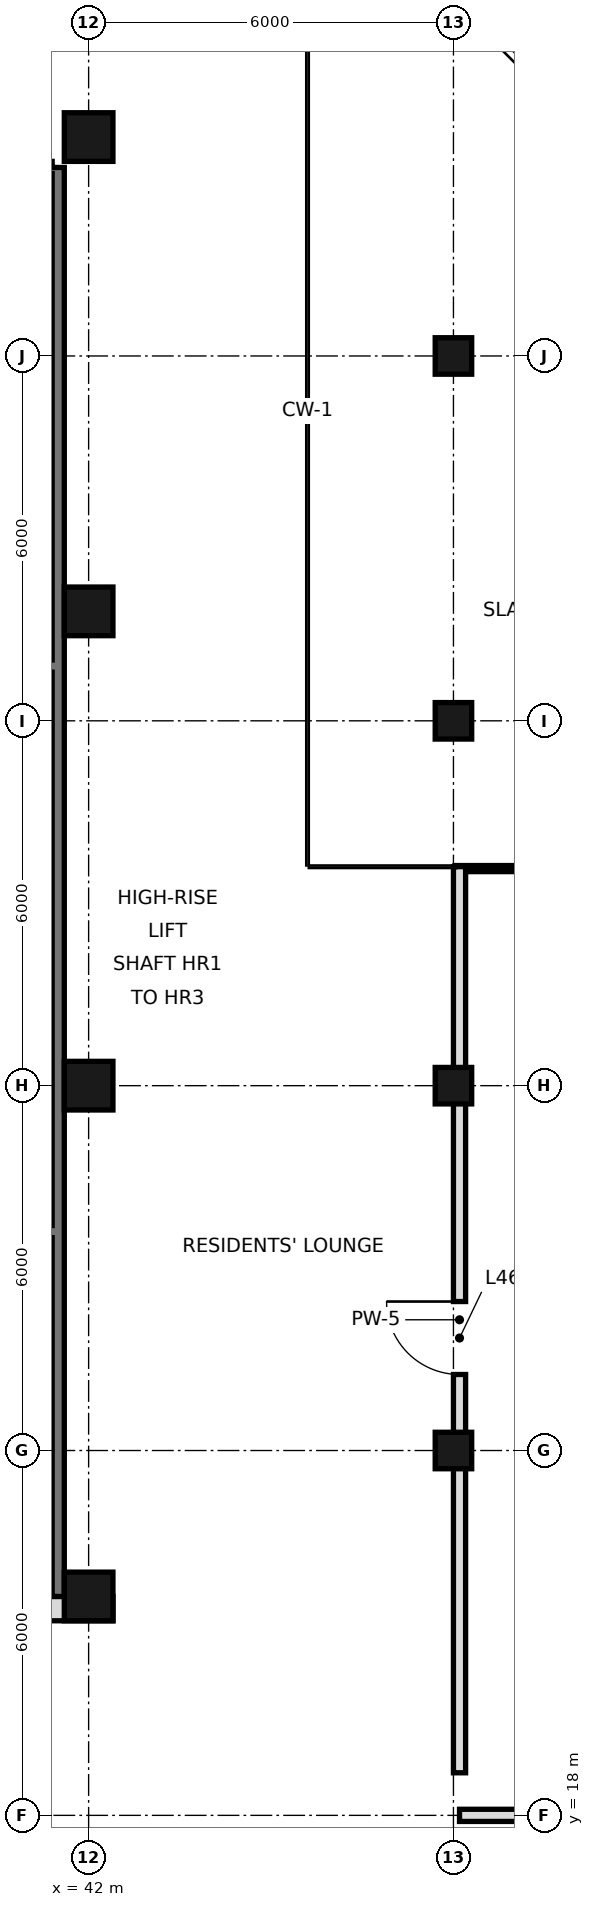
"""IFC4 building model, lengths in metres.
Left out: names, types, materials, properties, quantities, classifications, styles, units other than length and angle.
Written with IfcOpenShell. Run it as: python <this file> out.ifc"""

import sys

from ifc_helpers import new_model, si_unit, direction, frame, frame_2d, origin, origin_2d, place, context, subcontext, project, spatial, rectangle, hollow_rectangle, extrude, element, fill, save


model = new_model("IFC4")
c1 = context("Model", 3, precision=1e-05, world=origin(), true_north=direction((0.0, 1.0)))
c2 = subcontext(c1, "Body", "Model", "MODEL_VIEW")
j1 = project(units=[si_unit("LENGTHUNIT", "METRE"), si_unit("PLANEANGLEUNIT", "RADIAN")], contexts=[c1])
p1 = place(None, origin())
s1 = spatial("IfcSite", under=j1, at=p1, CompositionType="ELEMENT")
p2 = place(p1, origin())
s2 = spatial("IfcBuilding", under=s1, at=p2, CompositionType="ELEMENT")
p3 = place(p2, frame((0.0, 0.0, 199.2)))
s3 = spatial("IfcBuildingStorey", under=s2, at=p3, CompositionType="ELEMENT", Elevation=199.2)
for number, where, z_axis, x_axis in (
    (1, (42.0, 21.6, 0.0), (0.0, 0.0, 1.0), (1.0, 0.0, 0.0)),
    (2, (42.0, 30.0, 0.0), (0.0, 0.0, 1.0), (1.0, 0.0, 0.0)),
    (3, (42.0, 37.8, 0.0), (0.0, 0.0, 1.0), (1.0, 0.0, 0.0)),
    (4, (42.0, 45.6, 0.0), (0.0, 0.0, 1.0), (1.0, 0.0, 0.0)),
):
    element("IfcColumn", number, at=place(p3, frame(where, z_axis=z_axis, x_axis=x_axis)), inside=s3, PredefinedType="COLUMN", context=c2, shape_type="SweptSolid", body=[
        extrude(hollow_rectangle(XDim=0.8, YDim=0.8, WallThickness=0.04, at=origin_2d()), origin(), (0.0, 0.0, 1.0), 3.6),
    ])
for number, where, z_axis, x_axis in (
    (5, (48.0, 24.0, 0.0), (0.0, 0.0, 1.0), (1.0, 0.0, 0.0)),
    (6, (48.0, 30.0, 0.0), (0.0, 0.0, 1.0), (1.0, 0.0, 0.0)),
    (7, (48.0, 36.0, 0.0), (0.0, 0.0, 1.0), (1.0, 0.0, 0.0)),
    (8, (48.0, 42.0, 0.0), (0.0, 0.0, 1.0), (1.0, 0.0, 0.0)),
):
    element("IfcColumn", number, at=place(p3, frame(where, z_axis=z_axis, x_axis=x_axis)), inside=s3, PredefinedType="COLUMN", context=c2, shape_type="SweptSolid", body=[
        extrude(hollow_rectangle(XDim=0.6, YDim=0.6, WallThickness=0.028, at=origin_2d()), origin(), (0.0, 0.0, 1.0), 3.6),
    ])
p4 = place(p3, frame((54.55, 33.57, 0.0), z_axis=(0.0, 0.0, 1.0), x_axis=(-1.0, 0.0, 0.0)))
e9 = element("IfcWall", 9, at=p4, inside=s3, PredefinedType="SOLIDWALL", context=c2, shape_type="SweptSolid", body=[
    extrude(rectangle(XDim=6.525, YDim=0.1, at=frame_2d((3.263, 0.0))), origin(), (0.0, 0.0, 1.0), 3.42),
])
p5 = place(p4, frame((2.3, 0.0, 0.0)))
e10 = element("IfcOpeningElement", 10, at=p5, cuts=e9, PredefinedType="OPENING", context=c2, shape_type="SweptSolid", body=[
    extrude(rectangle(XDim=2.4, YDim=2.4, at=frame_2d((1.2, 1.2))), frame((0.0, 0.06, 0.0), z_axis=(0.0, -1.0, 0.0), x_axis=(1.0, 0.0, 0.0)), (0.0, 0.0, 1.0), 0.12),
])
p6 = place(p3, frame((48.1, 18.7, 0.0), z_axis=(0.0, 0.0, 1.0), x_axis=(0.0, 1.0, 0.0)))
e11 = element("IfcWall", 11, at=p6, inside=s3, PredefinedType="SOLIDWALL", context=c2, shape_type="SweptSolid", body=[
    extrude(rectangle(XDim=14.9, YDim=0.2, at=frame_2d((7.45, 0.0))), origin(), (0.0, 0.0, 1.0), 2.72),
])
p7 = place(p6, frame((6.55, 0.0, 0.0)))
e12 = element("IfcOpeningElement", 12, at=p7, cuts=e11, PredefinedType="OPENING", context=c2, shape_type="SweptSolid", body=[
    extrude(rectangle(XDim=1.2, YDim=2.4, at=frame_2d((0.6, 1.2))), frame((0.0, 0.11, 0.0), z_axis=(0.0, -1.0, 0.0), x_axis=(1.0, 0.0, 0.0)), (0.0, 0.0, 1.0), 0.22),
])
p8 = place(p3, frame((48.1, 18.0, 0.0), z_axis=(0.0, 0.0, 1.0), x_axis=(1.0, 0.0, 0.0)))
e13 = element("IfcWall", 13, at=p8, inside=s3, PredefinedType="SOLIDWALL", context=c2, shape_type="SweptSolid", body=[
    extrude(rectangle(XDim=6.5, YDim=0.2, at=frame_2d((3.25, 0.0))), origin(), (0.0, 0.0, 1.0), 2.72),
])
p9 = place(p3, frame((41.5, 21.6, 0.0), z_axis=(0.0, 0.0, 1.0), x_axis=(0.0, 1.0, 0.0)))
e14 = element("IfcWall", 14, at=p9, inside=s3, PredefinedType="SOLIDWALL", context=c2, shape_type="SweptSolid", body=[
    extrude(rectangle(XDim=23.5, YDim=0.2, at=frame_2d((11.75, 0.0))), origin(), (0.0, 0.0, 1.0), 3.42),
])
p10 = place(p3, frame((5.6, 21.4, 0.0), z_axis=(0.0, 0.0, 1.0), x_axis=(1.0, 0.0, 0.0)))
e15 = element("IfcWall", 15, at=p10, inside=s3, PredefinedType="SOLIDWALL", context=c2, shape_type="SweptSolid", body=[
    extrude(rectangle(XDim=36.8, YDim=0.4, at=frame_2d((18.4, 0.0))), origin(), (0.0, 0.0, 1.0), 3.42),
])
p11 = place(p10, frame((8.5, 0.0, 0.0)))
e16 = element("IfcOpeningElement", 16, at=p11, cuts=e15, PredefinedType="OPENING", context=c2, shape_type="SweptSolid", body=[
    extrude(rectangle(XDim=1.8, YDim=2.1, at=frame_2d((0.9, 1.05))), frame((0.0, 0.21, 0.0), z_axis=(0.0, -1.0, 0.0), x_axis=(1.0, 0.0, 0.0)), (0.0, 0.0, 1.0), 0.42),
])
p12 = place(p10, frame((17.5, 0.0, 0.0)))
e17 = element("IfcOpeningElement", 17, at=p12, cuts=e15, PredefinedType="OPENING", context=c2, shape_type="SweptSolid", body=[
    extrude(rectangle(XDim=1.8, YDim=2.1, at=frame_2d((0.9, 1.05))), frame((0.0, 0.21, 0.0), z_axis=(0.0, -1.0, 0.0), x_axis=(1.0, 0.0, 0.0)), (0.0, 0.0, 1.0), 0.42),
])
p13 = place(p10, frame((26.5, 0.0, 0.0)))
e18 = element("IfcOpeningElement", 18, at=p13, cuts=e15, PredefinedType="OPENING", context=c2, shape_type="SweptSolid", body=[
    extrude(rectangle(XDim=1.8, YDim=2.1, at=frame_2d((0.9, 1.05))), frame((0.0, 0.21, 0.0), z_axis=(0.0, -1.0, 0.0), x_axis=(1.0, 0.0, 0.0)), (0.0, 0.0, 1.0), 0.42),
])
p14 = place(p10, frame((4.5, 0.0, 0.0)))
e19 = element("IfcOpeningElement", 19, at=p14, cuts=e15, PredefinedType="OPENING", context=c2, shape_type="SweptSolid", body=[
    extrude(rectangle(XDim=1.2, YDim=2.1, at=frame_2d((0.6, 1.05))), frame((0.0, 0.21, 0.0), z_axis=(0.0, -1.0, 0.0), x_axis=(1.0, 0.0, 0.0)), (0.0, 0.0, 1.0), 0.42),
])
p15 = place(p10, frame((31.1, 0.0, 0.0)))
e20 = element("IfcOpeningElement", 20, at=p15, cuts=e15, PredefinedType="OPENING", context=c2, shape_type="SweptSolid", body=[
    extrude(rectangle(XDim=1.2, YDim=2.1, at=frame_2d((0.6, 1.05))), frame((0.0, 0.21, 0.0), z_axis=(0.0, -1.0, 0.0), x_axis=(1.0, 0.0, 0.0)), (0.0, 0.0, 1.0), 0.42),
])
p16 = place(p3, frame((38.7, 36.9, 0.0), z_axis=(0.0, 0.0, 1.0), x_axis=(1.0, 0.0, 0.0)))
e21 = element("IfcWall", 21, at=p16, inside=s3, PredefinedType="SOLIDWALL", context=c2, shape_type="SweptSolid", body=[
    extrude(rectangle(XDim=2.7, YDim=0.2, at=frame_2d((1.35, 0.0))), origin(), (0.0, 0.0, 1.0), 3.42),
])
p17 = place(p7, frame((1.2, 0.0, 0.0), z_axis=(0.0, 0.0, 1.0), x_axis=(-1.0, 0.0, 0.0)))
e22 = element("IfcDoor", 22, at=p17, inside=s3, OperationType="SINGLE_SWING_LEFT", PredefinedType="DOOR", context=c2, shape_type="SweptSolid", body=[
    extrude(rectangle(XDim=1.2, YDim=2.4, at=frame_2d((0.6, 1.2))), frame((0.0, 0.025, 0.0), z_axis=(0.0, -1.0, 0.0), x_axis=(1.0, 0.0, 0.0)), (0.0, 0.0, 1.0), 0.05),
])
fill(e12, e22)
save(model, sys.argv[1])
